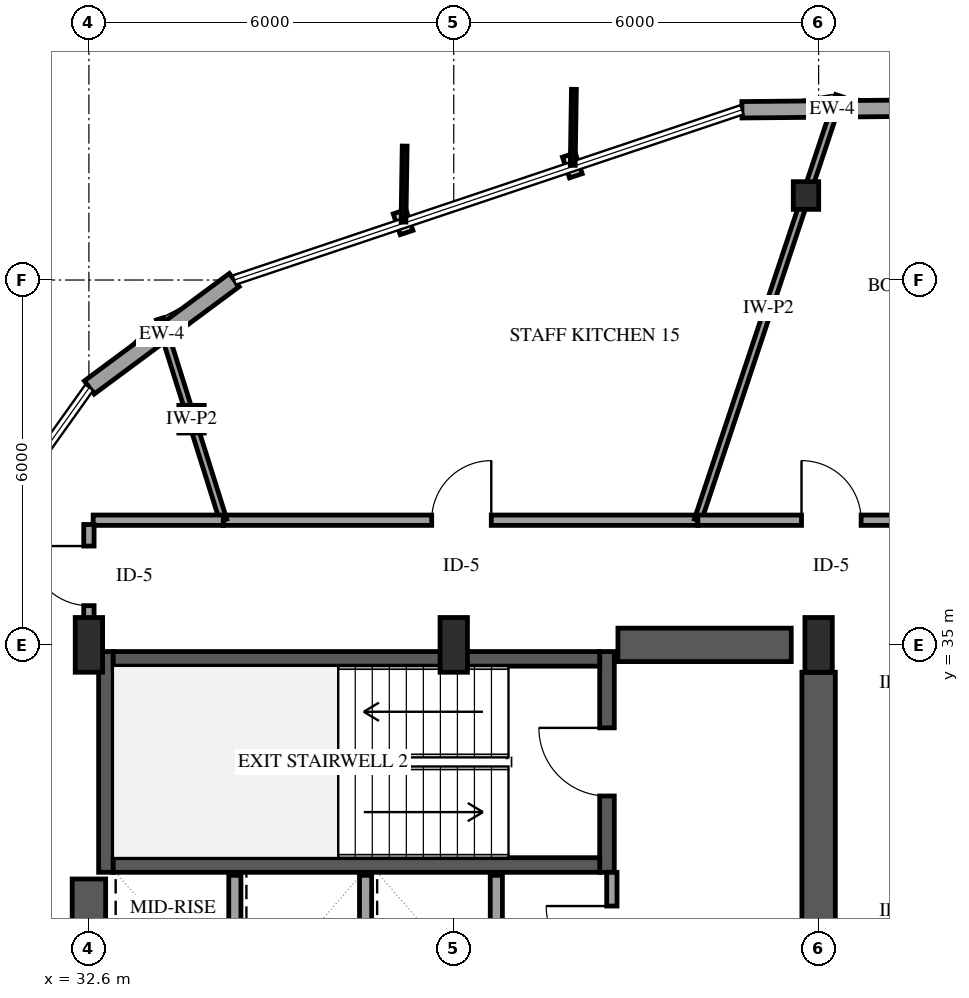
"""IFC4 building model, lengths in metres.
Left out: names, types, materials, properties, quantities, classifications, styles, units other than length and angle.
Written with IfcOpenShell. Run it as: python <this file> out.ifc"""

import sys

from ifc_helpers import new_model, si_unit, direction, frame, frame_2d, origin, origin_2d, place, context, subcontext, project, spatial, rectangle, i_section, extrude, element, fill, save


model = new_model("IFC4")
c1 = context("Model", 3, precision=1e-05, world=origin(), true_north=direction((0.0, 1.0)))
c2 = subcontext(c1, "Body", "Model", "MODEL_VIEW")
j1 = project(units=[si_unit("LENGTHUNIT", "METRE"), si_unit("PLANEANGLEUNIT", "RADIAN")], contexts=[c1])
p1 = place(None, origin())
s1 = spatial("IfcSite", under=j1, at=p1, CompositionType="ELEMENT")
p2 = place(p1, origin())
s2 = spatial("IfcBuilding", under=s1, at=p2, CompositionType="ELEMENT")
p3 = place(p2, frame((0.0, 0.0, 103.0)))
s3 = spatial("IfcBuildingStorey", under=s2, at=p3, CompositionType="ELEMENT", Elevation=103.0)
p4 = place(p3, frame((32.88, 31.26, 0.0), z_axis=(0.0, 0.0, 1.0), x_axis=(0.0, 1.0, 0.0)))
e1 = element("IfcWall", 1, at=p4, inside=s3, PredefinedType="SHEAR", context=c2, shape_type="SweptSolid", body=[
    extrude(rectangle(XDim=3.63, YDim=0.24, at=frame_2d((1.815, 0.0))), origin(), (0.0, 0.0, 1.0), 3.9),
])
p5 = place(p3, frame((41.12, 31.26, 0.0), z_axis=(0.0, 0.0, 1.0), x_axis=(0.0, 1.0, 0.0)))
e2 = element("IfcWall", 2, at=p5, inside=s3, PredefinedType="SHEAR", context=c2, shape_type="SweptSolid", body=[
    extrude(rectangle(XDim=3.63, YDim=0.24, at=frame_2d((1.815, 0.0))), origin(), (0.0, 0.0, 1.0), 3.9),
])
p6 = place(p5, frame((1.255, 0.0, 0.0)))
e3 = element("IfcOpeningElement", 3, at=p6, cuts=e2, PredefinedType="OPENING", context=c2, shape_type="SweptSolid", body=[
    extrude(rectangle(XDim=1.12, YDim=2.15, at=frame_2d((0.56, 1.075))), frame((0.0, 0.13, 0.0), z_axis=(0.0, -1.0, 0.0), x_axis=(1.0, 0.0, 0.0)), (0.0, 0.0, 1.0), 0.26),
])
for number, where, z_axis, x_axis in (
    (4, (33.0, 31.38, 0.0), (0.0, 0.0, 1.0), (1.0, 0.0, 0.0)),
    (5, (33.0, 34.77, 0.0), (0.0, 0.0, 1.0), (1.0, 0.0, 0.0)),
):
    element("IfcWall", number, at=place(p3, frame(where, z_axis=z_axis, x_axis=x_axis)), inside=s3, PredefinedType="SHEAR", context=c2, shape_type="SweptSolid", body=[
        extrude(rectangle(XDim=8.0, YDim=0.24, at=frame_2d((4.0, 0.0))), origin(), (0.0, 0.0, 1.0), 3.9),
    ])
p7 = place(p3, frame((32.6, 18.85, 0.0), z_axis=(0.0, 0.0, 1.0), x_axis=(0.0, 1.0, 0.0)))
e6 = element("IfcWall", 6, at=p7, inside=s3, PredefinedType="SHEAR", context=c2, shape_type="SweptSolid", body=[
    extrude(rectangle(XDim=12.3, YDim=0.55, at=frame_2d((6.15, 0.0))), origin(), (0.0, 0.0, 1.0), 3.9),
])
p8 = place(p3, frame((41.3, 35.0, 0.0), z_axis=(0.0, 0.0, 1.0), x_axis=(1.0, 0.0, 0.0)))
e7 = element("IfcWall", 7, at=p8, inside=s3, PredefinedType="SHEAR", context=c2, shape_type="SweptSolid", body=[
    extrude(rectangle(XDim=2.85, YDim=0.55, at=frame_2d((1.425, 0.0))), origin(), (0.0, 0.0, 1.0), 3.9),
])
p9 = place(p3, frame((44.6, 29.8, 0.0), z_axis=(0.0, 0.0, 1.0), x_axis=(0.0, 1.0, 0.0)))
e8 = element("IfcWall", 8, at=p9, inside=s3, PredefinedType="SHEAR", context=c2, shape_type="SweptSolid", body=[
    extrude(rectangle(XDim=4.75, YDim=0.55, at=frame_2d((2.375, 0.0))), origin(), (0.0, 0.0, 1.0), 3.9),
])
for number, where, z_axis, x_axis in (
    (9, (32.6, 35.0, 0.0), (0.0, 0.0, 1.0), (1.0, 0.0, 0.0)),
    (10, (38.6, 35.0, 0.0), (0.0, 0.0, 1.0), (1.0, 0.0, 0.0)),
    (11, (44.6, 35.0, 0.0), (0.0, 0.0, 1.0), (1.0, 0.0, 0.0)),
):
    element("IfcColumn", number, at=place(p3, frame(where, z_axis=z_axis, x_axis=x_axis)), inside=s3, PredefinedType="PILASTER", context=c2, shape_type="SweptSolid", body=[
        extrude(rectangle(XDim=0.45, YDim=0.9, at=origin_2d()), origin(), (0.0, 0.0, 1.0), 3.9),
    ])
for number, where, z_axis, x_axis in (
    (12, (44.393, 42.389, 0.0), (0.0, 0.0, 1.0), (1.0, 0.0, 0.0)),
    (13, (34.288, 38.711, 0.0), (0.0, 0.0, 1.0), (1.0, 0.0, 0.0)),
):
    element("IfcColumn", number, at=place(p3, frame(where, z_axis=z_axis, x_axis=x_axis)), inside=s3, PredefinedType="COLUMN", context=c2, shape_type="SweptSolid", body=[
        extrude(i_section(OverallWidth=0.418, OverallDepth=0.455, WebThickness=0.042, FlangeThickness=0.068, FilletRadius=0.038, at=origin_2d()), origin(), (0.0, 0.0, 1.0), 3.9),
    ])
p10 = place(p3, frame((46.306, 43.827, 0.0), z_axis=(0.0, 0.0, 1.0), x_axis=(-0.999955985226, -0.009382303071, 0.0)))
e14 = element("IfcWall", 14, at=p10, inside=s3, PredefinedType="SOLIDWALL", context=c2, shape_type="SweptSolid", body=[
    extrude(rectangle(XDim=2.967, YDim=0.27, at=frame_2d((1.483, 0.0))), origin(), (0.0, 0.0, 1.0), 2.979),
])
p11 = place(p3, frame((34.99, 41.0, 0.0), z_axis=(0.0, 0.0, 1.0), x_axis=(-0.803433261612, -0.595394822059, 0.0)))
e15 = element("IfcWall", 15, at=p11, inside=s3, PredefinedType="SOLIDWALL", context=c2, shape_type="SweptSolid", body=[
    extrude(rectangle(XDim=2.967, YDim=0.27, at=frame_2d((1.483, 0.0))), origin(), (0.0, 0.0, 1.0), 2.979),
])
for number, where, z_axis, x_axis in (
    (16, (35.0, 29.11, 0.0), (0.0, 0.0, 1.0), (0.0, 1.0, 0.0)),
    (17, (37.15, 29.11, 0.0), (0.0, 0.0, 1.0), (0.0, 1.0, 0.0)),
    (18, (39.3, 29.11, 0.0), (0.0, 0.0, 1.0), (0.0, 1.0, 0.0)),
):
    element("IfcWall", number, at=place(p3, frame(where, z_axis=z_axis, x_axis=x_axis)), inside=s3, PredefinedType="SOLIDWALL", context=c2, shape_type="SweptSolid", body=[
        extrude(rectangle(XDim=2.1, YDim=0.2, at=frame_2d((1.05, 0.0))), origin(), (0.0, 0.0, 1.0), 3.6),
    ])
p12 = place(p3, frame((34.81, 37.05, 0.0), z_axis=(0.0, 0.0, 1.0), x_axis=(1.0, 0.0, 0.0)))
e19 = element("IfcWall", 19, at=p12, inside=s3, PredefinedType="PARTITIONING", context=c2, shape_type="SweptSolid", body=[
    extrude(rectangle(XDim=7.804, YDim=0.17, at=frame_2d((3.902, 0.0))), origin(), (0.0, 0.0, 1.0), 3.6),
])
p13 = place(p12, frame((3.427, 0.0, 0.0)))
e20 = element("IfcOpeningElement", 20, at=p13, cuts=e19, PredefinedType="OPENING", context=c2, shape_type="SweptSolid", body=[
    extrude(rectangle(XDim=0.98, YDim=2.15, at=frame_2d((0.49, 1.075))), frame((0.0, 0.095, 0.0), z_axis=(0.0, -1.0, 0.0), x_axis=(1.0, 0.0, 0.0)), (0.0, 0.0, 1.0), 0.19),
])
p14 = place(p3, frame((42.614, 37.05, 0.0), z_axis=(0.0, 0.0, 1.0), x_axis=(0.3159789006, 0.948766216924, 0.0)))
e21 = element("IfcWall", 21, at=p14, inside=s3, PredefinedType="PARTITIONING", context=c2, shape_type="SweptSolid", body=[
    extrude(rectangle(XDim=7.358, YDim=0.12, at=frame_2d((3.679, 0.0))), origin(), (0.0, 0.0, 1.0), 2.895),
])
p15 = place(p3, frame((42.614, 37.05, 0.0), z_axis=(0.0, 0.0, 1.0), x_axis=(1.0, 0.0, 0.0)))
e22 = element("IfcWall", 22, at=p15, inside=s3, PredefinedType="PARTITIONING", context=c2, shape_type="SweptSolid", body=[
    extrude(rectangle(XDim=4.36, YDim=0.17, at=frame_2d((2.18, 0.0))), origin(), (0.0, 0.0, 1.0), 3.6),
])
p16 = place(p15, frame((1.705, 0.0, 0.0)))
e23 = element("IfcOpeningElement", 23, at=p16, cuts=e22, PredefinedType="OPENING", context=c2, shape_type="SweptSolid", body=[
    extrude(rectangle(XDim=0.98, YDim=2.15, at=frame_2d((0.49, 1.075))), frame((0.0, 0.095, 0.0), z_axis=(0.0, -1.0, 0.0), x_axis=(1.0, 0.0, 0.0)), (0.0, 0.0, 1.0), 0.19),
])
p17 = place(p3, frame((34.81, 37.05, 0.0), z_axis=(0.0, 0.0, 1.0), x_axis=(-0.30010816063, 0.953905179734, 0.0)))
e24 = element("IfcWall", 24, at=p17, inside=s3, PredefinedType="PARTITIONING", context=c2, shape_type="SweptSolid", body=[
    extrude(rectangle(XDim=3.472, YDim=0.12, at=frame_2d((1.736, 0.0))), origin(), (0.0, 0.0, 1.0), 2.895),
])
p18 = place(p3, frame((41.2, 29.07, 0.0), z_axis=(0.0, 0.0, 1.0), x_axis=(0.0, 1.0, 0.0)))
e25 = element("IfcWall", 25, at=p18, inside=s3, PredefinedType="PARTITIONING", context=c2, shape_type="SweptSolid", body=[
    extrude(rectangle(XDim=2.19, YDim=0.17, at=frame_2d((1.095, 0.0))), origin(), (0.0, 0.0, 1.0), 3.6),
])
p19 = place(p18, frame((0.555, 0.0, 0.0)))
e26 = element("IfcOpeningElement", 26, at=p19, cuts=e25, PredefinedType="OPENING", context=c2, shape_type="SweptSolid", body=[
    extrude(rectangle(XDim=1.08, YDim=2.15, at=frame_2d((0.54, 1.075))), frame((0.0, 0.095, 0.0), z_axis=(0.0, -1.0, 0.0), x_axis=(1.0, 0.0, 0.0)), (0.0, 0.0, 1.0), 0.19),
])
p20 = place(p3, frame((32.67, 37.05, 0.0), z_axis=(0.0, 0.0, 1.0), x_axis=(1.0, 0.0, 0.0)))
e27 = element("IfcWall", 27, at=p20, inside=s3, PredefinedType="PARTITIONING", context=c2, shape_type="SweptSolid", body=[
    extrude(rectangle(XDim=2.14, YDim=0.17, at=frame_2d((1.07, 0.0))), origin(), (0.0, 0.0, 1.0), 3.6),
])
p21 = place(p3, frame((32.6, 35.07, 0.0), z_axis=(0.0, 0.0, 1.0), x_axis=(0.0, 1.0, 0.0)))
e28 = element("IfcWall", 28, at=p21, inside=s3, PredefinedType="PARTITIONING", context=c2, shape_type="SweptSolid", body=[
    extrude(rectangle(XDim=1.91, YDim=0.17, at=frame_2d((0.955, 0.0))), origin(), (0.0, 0.0, 1.0), 3.6),
])
p22 = place(p21, frame((0.575, 0.0, 0.0)))
e29 = element("IfcOpeningElement", 29, at=p22, cuts=e28, PredefinedType="OPENING", context=c2, shape_type="SweptSolid", body=[
    extrude(rectangle(XDim=0.98, YDim=2.15, at=frame_2d((0.49, 1.075))), frame((0.0, 0.095, 0.0), z_axis=(0.0, -1.0, 0.0), x_axis=(1.0, 0.0, 0.0)), (0.0, 0.0, 1.0), 0.19),
])
p23 = place(p6, origin())
e30 = element("IfcDoor", 30, at=p23, inside=s3, OperationType="SINGLE_SWING_RIGHT", PredefinedType="DOOR", context=c2, shape_type="SweptSolid", body=[
    extrude(rectangle(XDim=1.12, YDim=2.15, at=frame_2d((0.56, 1.075))), frame((0.0, 0.025, 0.0), z_axis=(0.0, -1.0, 0.0), x_axis=(1.0, 0.0, 0.0)), (0.0, 0.0, 1.0), 0.05),
])
fill(e3, e30)
p24 = place(p13, origin())
e31 = element("IfcDoor", 31, at=p24, inside=s3, OperationType="SINGLE_SWING_RIGHT", PredefinedType="DOOR", context=c2, shape_type="SweptSolid", body=[
    extrude(rectangle(XDim=0.98, YDim=2.15, at=frame_2d((0.49, 1.075))), frame((0.0, 0.025, 0.0), z_axis=(0.0, -1.0, 0.0), x_axis=(1.0, 0.0, 0.0)), (0.0, 0.0, 1.0), 0.05),
])
fill(e20, e31)
p25 = place(p16, origin())
e32 = element("IfcDoor", 32, at=p25, inside=s3, OperationType="SINGLE_SWING_LEFT", PredefinedType="DOOR", context=c2, shape_type="SweptSolid", body=[
    extrude(rectangle(XDim=0.98, YDim=2.15, at=frame_2d((0.49, 1.075))), frame((0.0, 0.025, 0.0), z_axis=(0.0, -1.0, 0.0), x_axis=(1.0, 0.0, 0.0)), (0.0, 0.0, 1.0), 0.05),
])
fill(e23, e32)
p26 = place(p19, origin())
e33 = element("IfcDoor", 33, at=p26, inside=s3, OperationType="SINGLE_SWING_RIGHT", PredefinedType="DOOR", context=c2, shape_type="SweptSolid", body=[
    extrude(rectangle(XDim=1.08, YDim=2.15, at=frame_2d((0.54, 1.075))), frame((0.0, 0.025, 0.0), z_axis=(0.0, -1.0, 0.0), x_axis=(1.0, 0.0, 0.0)), (0.0, 0.0, 1.0), 0.05),
])
fill(e26, e33)
p27 = place(p22, origin())
e34 = element("IfcDoor", 34, at=p27, inside=s3, OperationType="SINGLE_SWING_RIGHT", PredefinedType="DOOR", context=c2, shape_type="SweptSolid", body=[
    extrude(rectangle(XDim=0.98, YDim=2.15, at=frame_2d((0.49, 1.075))), frame((0.0, 0.025, 0.0), z_axis=(0.0, -1.0, 0.0), x_axis=(1.0, 0.0, 0.0)), (0.0, 0.0, 1.0), 0.05),
])
fill(e29, e34)
save(model, sys.argv[1])
